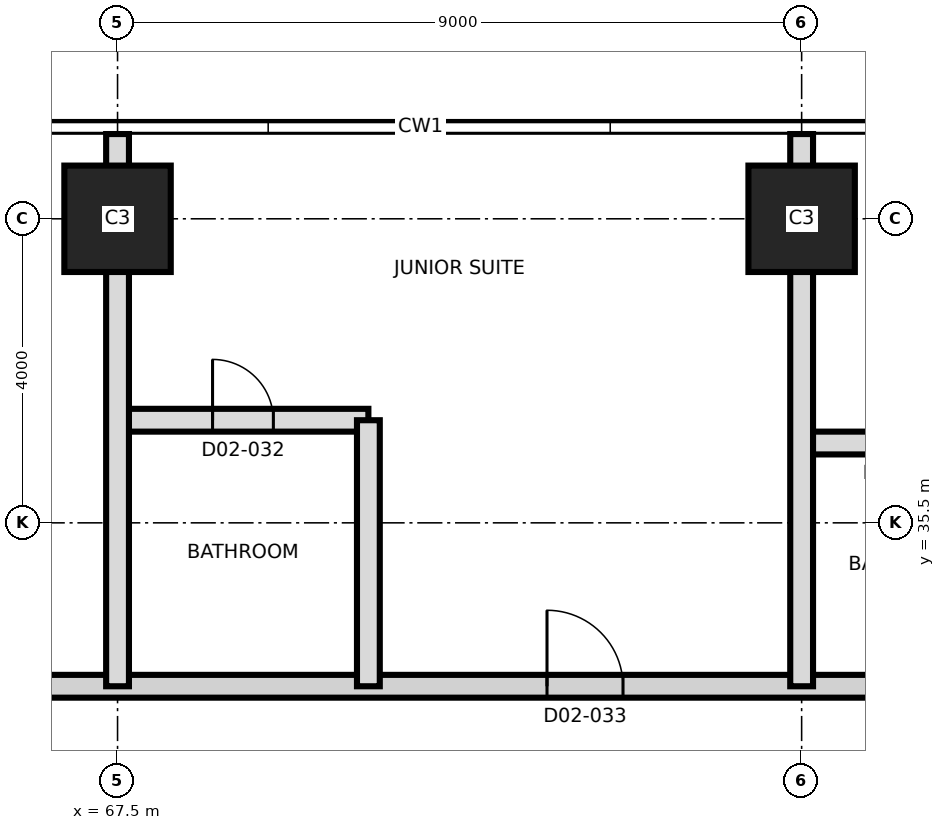
"""IFC4 building model, lengths in metres.
Left out: names, types, materials, properties, quantities, classifications, styles, units other than length and angle.
Written with IfcOpenShell. Run it as: python <this file> out.ifc"""

import sys

from ifc_helpers import new_model, si_unit, direction, frame, frame_2d, origin, origin_2d, place, context, subcontext, project, spatial, rectangle, extrude, element, fill, save


model = new_model("IFC4")
c1 = context("Model", 3, precision=1e-05, world=origin(), true_north=direction((0.0, 1.0)))
c2 = subcontext(c1, "Body", "Model", "MODEL_VIEW")
j1 = project(units=[si_unit("LENGTHUNIT", "METRE"), si_unit("PLANEANGLEUNIT", "RADIAN")], contexts=[c1])
p1 = place(None, origin())
s1 = spatial("IfcSite", under=j1, at=p1, CompositionType="ELEMENT")
p2 = place(p1, origin())
s2 = spatial("IfcBuilding", under=s1, at=p2, CompositionType="ELEMENT")
p3 = place(p2, frame((0.0, 0.0, 44.6)))
s3 = spatial("IfcBuildingStorey", under=s2, at=p3, CompositionType="ELEMENT", Elevation=44.6)
for number, where, z_axis, x_axis in (
    (1, (67.5, 39.5, 0.0), (0.0, 0.0, 1.0), (1.0, 0.0, 0.0)),
    (2, (76.5, 39.5, 0.0), (0.0, 0.0, 1.0), (1.0, 0.0, 0.0)),
):
    element("IfcColumn", number, at=place(p3, frame(where, z_axis=z_axis, x_axis=x_axis)), inside=s3, PredefinedType="COLUMN", context=c2, shape_type="SweptSolid", body=[
        extrude(rectangle(XDim=1.4, YDim=1.4, at=origin_2d()), origin(), (0.0, 0.0, 1.0), 3.7),
    ])
p4 = place(p3, frame((58.95, 33.35, 0.0), z_axis=(0.0, 0.0, 1.0), x_axis=(1.0, 0.0, 0.0)))
e3 = element("IfcWall", 3, at=p4, inside=s3, PredefinedType="PARTITIONING", context=c2, shape_type="SweptSolid", body=[
    extrude(rectangle(XDim=26.38, YDim=0.3, at=frame_2d((13.19, 0.0))), origin(), (0.0, 0.0, 1.0), 3.4),
])
p5 = place(p4, frame((2.6, 0.0, 0.0)))
e4 = element("IfcOpeningElement", 4, at=p5, cuts=e3, PredefinedType="OPENING", context=c2, shape_type="SweptSolid", body=[
    extrude(rectangle(XDim=1.0, YDim=2.1, at=frame_2d((0.5, 1.05))), frame((0.0, 0.16, 0.0), z_axis=(0.0, -1.0, 0.0), x_axis=(1.0, 0.0, 0.0)), (0.0, 0.0, 1.0), 0.32),
])
p6 = place(p4, frame((5.55, 0.0, 0.0)))
e5 = element("IfcOpeningElement", 5, at=p6, cuts=e3, PredefinedType="OPENING", context=c2, shape_type="SweptSolid", body=[
    extrude(rectangle(XDim=1.4, YDim=2.1, at=frame_2d((0.7, 1.05))), frame((0.0, 0.16, 0.0), z_axis=(0.0, -1.0, 0.0), x_axis=(1.0, 0.0, 0.0)), (0.0, 0.0, 1.0), 0.32),
])
p7 = place(p4, frame((14.2, 0.0, 0.0)))
e6 = element("IfcOpeningElement", 6, at=p7, cuts=e3, PredefinedType="OPENING", context=c2, shape_type="SweptSolid", body=[
    extrude(rectangle(XDim=1.0, YDim=2.4, at=frame_2d((0.5, 1.2))), frame((0.0, 0.16, 0.0), z_axis=(0.0, -1.0, 0.0), x_axis=(1.0, 0.0, 0.0)), (0.0, 0.0, 1.0), 0.32),
])
p8 = place(p4, frame((20.83, 0.0, 0.0)))
e7 = element("IfcOpeningElement", 7, at=p8, cuts=e3, PredefinedType="OPENING", context=c2, shape_type="SweptSolid", body=[
    extrude(rectangle(XDim=1.0, YDim=2.1, at=frame_2d((0.5, 1.05))), frame((0.0, 0.16, 0.0), z_axis=(0.0, -1.0, 0.0), x_axis=(1.0, 0.0, 0.0)), (0.0, 0.0, 1.0), 0.32),
])
p9 = place(p4, frame((22.63, 0.0, 0.0)))
e8 = element("IfcOpeningElement", 8, at=p9, cuts=e3, PredefinedType="OPENING", context=c2, shape_type="SweptSolid", body=[
    extrude(rectangle(XDim=1.0, YDim=2.1, at=frame_2d((0.5, 1.05))), frame((0.0, 0.16, 0.0), z_axis=(0.0, -1.0, 0.0), x_axis=(1.0, 0.0, 0.0)), (0.0, 0.0, 1.0), 0.32),
])
p10 = place(p3, frame((76.5, 36.55, 0.0), z_axis=(0.0, 0.0, 1.0), x_axis=(1.0, 0.0, 0.0)))
e9 = element("IfcWall", 9, at=p10, inside=s3, PredefinedType="PARTITIONING", context=c2, shape_type="SweptSolid", body=[
    extrude(rectangle(XDim=2.7, YDim=0.3, at=frame_2d((1.35, 0.0))), origin(), (0.0, 0.0, 1.0), 3.4),
])
p11 = place(p10, frame((0.95, 0.0, 0.0)))
e10 = element("IfcOpeningElement", 10, at=p11, cuts=e9, PredefinedType="OPENING", context=c2, shape_type="SweptSolid", body=[
    extrude(rectangle(XDim=0.8, YDim=2.1, at=frame_2d((0.4, 1.05))), frame((0.0, 0.16, 0.0), z_axis=(0.0, -1.0, 0.0), x_axis=(1.0, 0.0, 0.0)), (0.0, 0.0, 1.0), 0.32),
])
p12 = place(p3, frame((67.5, 36.85, 0.0), z_axis=(0.0, 0.0, 1.0), x_axis=(1.0, 0.0, 0.0)))
e11 = element("IfcWall", 11, at=p12, inside=s3, PredefinedType="PARTITIONING", context=c2, shape_type="SweptSolid", body=[
    extrude(rectangle(XDim=3.3, YDim=0.3, at=frame_2d((1.65, 0.0))), origin(), (0.0, 0.0, 1.0), 3.4),
])
p13 = place(p12, frame((1.25, 0.0, 0.0)))
e12 = element("IfcOpeningElement", 12, at=p13, cuts=e11, PredefinedType="OPENING", context=c2, shape_type="SweptSolid", body=[
    extrude(rectangle(XDim=0.8, YDim=2.1, at=frame_2d((0.4, 1.05))), frame((0.0, 0.16, 0.0), z_axis=(0.0, -1.0, 0.0), x_axis=(1.0, 0.0, 0.0)), (0.0, 0.0, 1.0), 0.32),
])
p14 = place(p3, frame((67.5, 33.35, 0.0), z_axis=(0.0, 0.0, 1.0), x_axis=(0.0, 1.0, 0.0)))
e13 = element("IfcWall", 13, at=p14, inside=s3, PredefinedType="PARTITIONING", context=c2, shape_type="SweptSolid", body=[
    extrude(rectangle(XDim=7.265, YDim=0.3, at=frame_2d((3.632, 0.0))), origin(), (0.0, 0.0, 1.0), 3.4),
])
p15 = place(p3, frame((70.8, 33.35, 0.0), z_axis=(0.0, 0.0, 1.0), x_axis=(0.0, 1.0, 0.0)))
e14 = element("IfcWall", 14, at=p15, inside=s3, PredefinedType="PARTITIONING", context=c2, shape_type="SweptSolid", body=[
    extrude(rectangle(XDim=3.5, YDim=0.3, at=frame_2d((1.75, 0.0))), origin(), (0.0, 0.0, 1.0), 3.4),
])
p16 = place(p3, frame((76.5, 33.35, 0.0), z_axis=(0.0, 0.0, 1.0), x_axis=(0.0, 1.0, 0.0)))
e15 = element("IfcWall", 15, at=p16, inside=s3, PredefinedType="PARTITIONING", context=c2, shape_type="SweptSolid", body=[
    extrude(rectangle(XDim=7.265, YDim=0.3, at=frame_2d((3.632, 0.0))), origin(), (0.0, 0.0, 1.0), 3.4),
])
p17 = place(p13, origin())
e16 = element("IfcDoor", 16, at=p17, inside=s3, OperationType="SINGLE_SWING_LEFT", PredefinedType="DOOR", context=c2, shape_type="SweptSolid", body=[
    extrude(rectangle(XDim=0.8, YDim=2.1, at=frame_2d((0.4, 1.05))), frame((0.0, 0.025, 0.0), z_axis=(0.0, -1.0, 0.0), x_axis=(1.0, 0.0, 0.0)), (0.0, 0.0, 1.0), 0.05),
])
fill(e12, e16)
p18 = place(p7, origin())
e17 = element("IfcDoor", 17, at=p18, inside=s3, OperationType="SINGLE_SWING_LEFT", PredefinedType="DOOR", context=c2, shape_type="SweptSolid", body=[
    extrude(rectangle(XDim=1.0, YDim=2.4, at=frame_2d((0.5, 1.2))), frame((0.0, 0.025, 0.0), z_axis=(0.0, -1.0, 0.0), x_axis=(1.0, 0.0, 0.0)), (0.0, 0.0, 1.0), 0.05),
])
fill(e6, e17)
save(model, sys.argv[1])
